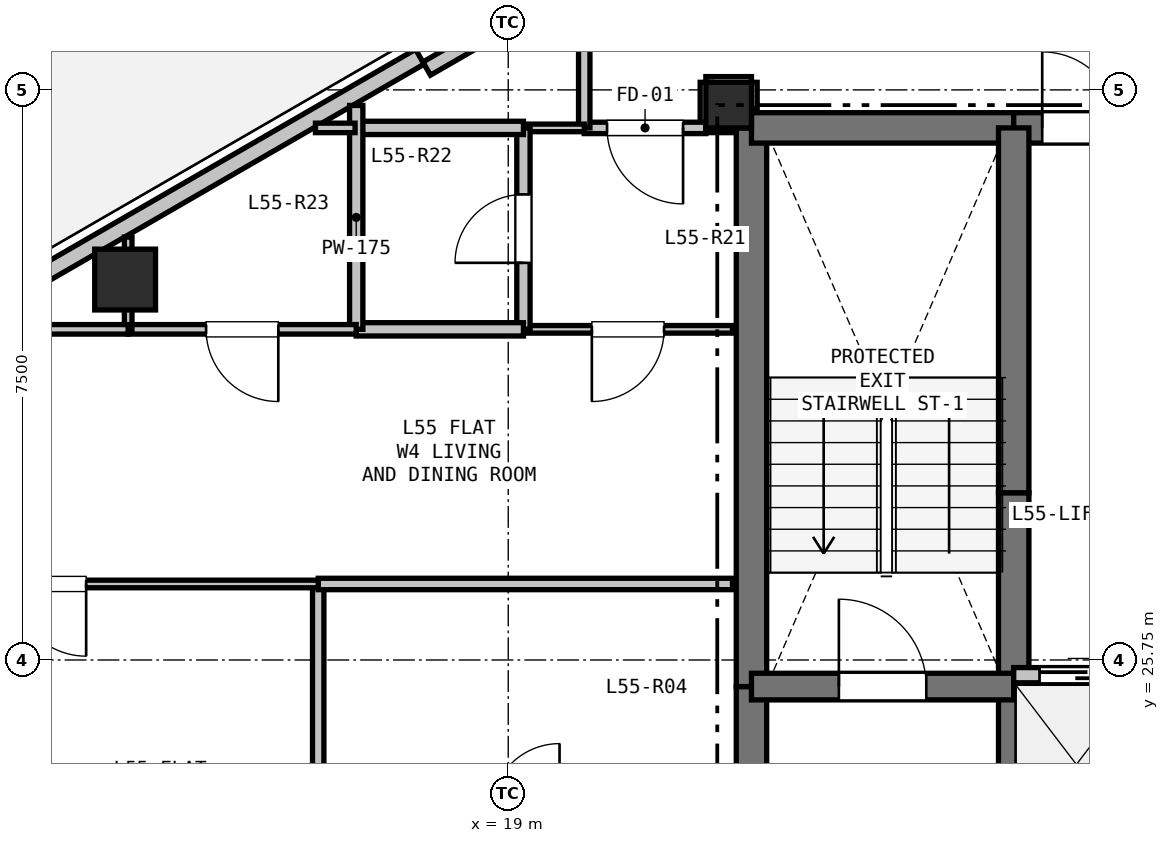
"""IFC4 building model, lengths in metres.
Left out: names, types, materials, properties, quantities, classifications, styles, units other than length and angle.
Written with IfcOpenShell. Run it as: python <this file> out.ifc"""

import sys

from ifc_helpers import new_model, si_unit, direction, frame, frame_2d, origin, origin_2d, place, context, subcontext, project, spatial, rectangle, hollow_rectangle, extrude, element, fill, save


model = new_model("IFC4")
c1 = context("Model", 3, precision=1e-05, world=origin(), true_north=direction((0.0, 1.0)))
c2 = subcontext(c1, "Body", "Model", "MODEL_VIEW")
j1 = project(units=[si_unit("LENGTHUNIT", "METRE"), si_unit("PLANEANGLEUNIT", "RADIAN")], contexts=[c1])
p1 = place(None, origin())
s1 = spatial("IfcSite", under=j1, at=p1, CompositionType="ELEMENT")
p2 = place(p1, origin())
s2 = spatial("IfcBuilding", under=s1, at=p2, CompositionType="ELEMENT")
p3 = place(p2, frame((0.0, 0.0, 198.6)))
s3 = spatial("IfcBuildingStorey", under=s2, at=p3, CompositionType="ELEMENT", Elevation=198.6)
p4 = place(p3, frame((21.9, 33.05, 0.0), z_axis=(0.0, 0.0, 1.0), x_axis=(1.0, 0.0, 0.0)))
e1 = element("IfcColumn", 1, at=p4, inside=s3, PredefinedType="COLUMN", context=c2, shape_type="SweptSolid", body=[
    extrude(rectangle(XDim=0.6, YDim=0.6, at=origin_2d()), origin(), (0.0, 0.0, 1.0), 3.3),
])
p5 = place(p3, frame((13.96, 30.755, 0.0), z_axis=(0.0, 0.0, 1.0), x_axis=(1.0, 0.0, 0.0)))
e2 = element("IfcColumn", 2, at=p5, inside=s3, PredefinedType="COLUMN", context=c2, shape_type="SweptSolid", body=[
    extrude(hollow_rectangle(XDim=0.8, YDim=0.8, WallThickness=0.025, at=origin_2d()), origin(), (0.0, 0.0, 1.0), 3.3),
])
p6 = place(p3, frame((9.438, 28.837, 0.0), z_axis=(0.0, 0.0, 1.0), x_axis=(0.866027133173, 0.499997004599, 0.0)))
e3 = element("IfcWall", 3, at=p6, inside=s3, PredefinedType="SOLIDWALL", context=c2, shape_type="SweptSolid", body=[
    extrude(rectangle(XDim=9.699, YDim=0.225, at=frame_2d((4.849, 0.0))), origin(), (0.0, 0.0, 1.0), 2.69),
])
p7 = place(p3, frame((17.927, 33.53, 0.0), z_axis=(0.0, 0.0, 1.0), x_axis=(0.86605165483, 0.499954529098, 0.0)))
e4 = element("IfcWall", 4, at=p7, inside=s3, PredefinedType="PARAPET", context=c2, shape_type="SweptSolid", body=[
    extrude(rectangle(XDim=1.7, YDim=0.2, at=frame_2d((0.85, 0.0))), origin(), (0.0, 0.0, 1.0), 2.69),
])
p8 = place(p3, frame((17.837, 19.814, 0.0), z_axis=(0.0, 0.0, 1.0), x_axis=(-0.866027133173, 0.499997004599, 0.0)))
e5 = element("IfcWall", 5, at=p8, inside=s3, PredefinedType="SOLIDWALL", context=c2, shape_type="SweptSolid", body=[
    extrude(rectangle(XDim=9.699, YDim=0.225, at=frame_2d((4.849, 0.0))), origin(), (0.0, 0.0, 1.0), 2.69),
])
p9 = place(p8, frame((5.108, 0.0, 0.9)))
e6 = element("IfcOpeningElement", 6, at=p9, cuts=e5, PredefinedType="OPENING", context=c2, shape_type="SweptSolid", body=[
    extrude(rectangle(XDim=1.2, YDim=1.4, at=frame_2d((0.6, 0.7))), frame((0.0, 0.123, 0.0), z_axis=(0.0, -1.0, 0.0), x_axis=(1.0, 0.0, 0.0)), (0.0, 0.0, 1.0), 0.245),
])
p10 = place(p3, frame((22.2, 20.75, 0.0), z_axis=(0.0, 0.0, 1.0), x_axis=(0.0, 1.0, 0.0)))
e7 = element("IfcWall", 7, at=p10, inside=s3, PredefinedType="SHEAR", context=c2, shape_type="SweptSolid", body=[
    extrude(rectangle(XDim=4.65, YDim=0.4, at=frame_2d((2.325, 0.0))), origin(), (0.0, 0.0, 1.0), 3.07),
])
p11 = place(p3, frame((22.2, 25.4, 0.0), z_axis=(0.0, 0.0, 1.0), x_axis=(0.0, 1.0, 0.0)))
e8 = element("IfcWall", 8, at=p11, inside=s3, PredefinedType="SHEAR", context=c2, shape_type="SweptSolid", body=[
    extrude(rectangle(XDim=7.35, YDim=0.4, at=frame_2d((3.675, 0.0))), origin(), (0.0, 0.0, 1.0), 3.07),
])
p12 = place(p3, frame((22.2, 32.75, 0.0), z_axis=(0.0, 0.0, 1.0), x_axis=(1.0, 0.0, 0.0)))
e9 = element("IfcWall", 9, at=p12, inside=s3, PredefinedType="SHEAR", context=c2, shape_type="SweptSolid", body=[
    extrude(rectangle(XDim=3.45, YDim=0.4, at=frame_2d((1.725, 0.0))), origin(), (0.0, 0.0, 1.0), 3.07),
])
p13 = place(p3, frame((25.65, 32.75, 0.0), z_axis=(0.0, 0.0, 1.0), x_axis=(1.0, 0.0, 0.0)))
e10 = element("IfcWall", 10, at=p13, inside=s3, PredefinedType="SHEAR", context=c2, shape_type="SweptSolid", body=[
    extrude(rectangle(XDim=1.75, YDim=0.4, at=frame_2d((0.875, 0.0))), origin(), (0.0, 0.0, 1.0), 3.07),
])
p14 = place(p13, frame((0.375, 0.0, 0.0)))
e11 = element("IfcOpeningElement", 11, at=p14, cuts=e10, PredefinedType="OPENING", context=c2, shape_type="SweptSolid", body=[
    extrude(rectangle(XDim=1.0, YDim=2.15, at=frame_2d((0.5, 1.075))), frame((0.0, 0.21, 0.0), z_axis=(0.0, -1.0, 0.0), x_axis=(1.0, 0.0, 0.0)), (0.0, 0.0, 1.0), 0.42),
])
p15 = place(p3, frame((25.65, 22.75, 0.0), z_axis=(0.0, 0.0, 1.0), x_axis=(0.0, 1.0, 0.0)))
e12 = element("IfcWall", 12, at=p15, inside=s3, PredefinedType="SHEAR", context=c2, shape_type="SweptSolid", body=[
    extrude(rectangle(XDim=2.8, YDim=0.4, at=frame_2d((1.4, 0.0))), origin(), (0.0, 0.0, 1.0), 3.07),
])
p16 = place(p3, frame((25.65, 25.55, 0.0), z_axis=(0.0, 0.0, 1.0), x_axis=(0.0, 1.0, 0.0)))
e13 = element("IfcWall", 13, at=p16, inside=s3, PredefinedType="SHEAR", context=c2, shape_type="SweptSolid", body=[
    extrude(rectangle(XDim=2.4, YDim=0.4, at=frame_2d((1.2, 0.0))), origin(), (0.0, 0.0, 1.0), 3.07),
])
p17 = place(p3, frame((25.65, 27.95, 0.0), z_axis=(0.0, 0.0, 1.0), x_axis=(0.0, 1.0, 0.0)))
e14 = element("IfcWall", 14, at=p17, inside=s3, PredefinedType="SHEAR", context=c2, shape_type="SweptSolid", body=[
    extrude(rectangle(XDim=4.8, YDim=0.4, at=frame_2d((2.4, 0.0))), origin(), (0.0, 0.0, 1.0), 3.07),
])
p18 = place(p3, frame((22.2, 25.4, 0.0), z_axis=(0.0, 0.0, 1.0), x_axis=(1.0, 0.0, 0.0)))
e15 = element("IfcWall", 15, at=p18, inside=s3, PredefinedType="SHEAR", context=c2, shape_type="SweptSolid", body=[
    extrude(rectangle(XDim=3.45, YDim=0.35, at=frame_2d((1.725, 0.0))), origin(), (0.0, 0.0, 1.0), 3.07),
])
p19 = place(p18, frame((1.15, 0.0, 0.0)))
e16 = element("IfcOpeningElement", 16, at=p19, cuts=e15, PredefinedType="OPENING", context=c2, shape_type="SweptSolid", body=[
    extrude(rectangle(XDim=1.15, YDim=2.15, at=frame_2d((0.575, 1.075))), frame((0.0, 0.185, 0.0), z_axis=(0.0, -1.0, 0.0), x_axis=(1.0, 0.0, 0.0)), (0.0, 0.0, 1.0), 0.37),
])
p20 = place(p3, frame((25.65, 25.55, 0.0), z_axis=(0.0, 0.0, 1.0), x_axis=(1.0, 0.0, 0.0)))
e17 = element("IfcWall", 17, at=p20, inside=s3, PredefinedType="PARTITIONING", context=c2, shape_type="SweptSolid", body=[
    extrude(rectangle(XDim=4.95, YDim=0.2, at=frame_2d((2.475, 0.0))), origin(), (0.0, 0.0, 1.0), 3.07),
])
p21 = place(p20, frame((0.34, 0.0, 0.0)))
e18 = element("IfcOpeningElement", 18, at=p21, cuts=e17, PredefinedType="OPENING", context=c2, shape_type="SweptSolid", body=[
    extrude(rectangle(XDim=1.1, YDim=2.15, at=frame_2d((0.55, 1.075))), frame((0.0, 0.11, 0.0), z_axis=(0.0, -1.0, 0.0), x_axis=(1.0, 0.0, 0.0)), (0.0, 0.0, 1.0), 0.22),
])
p22 = place(p20, frame((1.99, 0.0, 0.0)))
e19 = element("IfcOpeningElement", 19, at=p22, cuts=e17, PredefinedType="OPENING", context=c2, shape_type="SweptSolid", body=[
    extrude(rectangle(XDim=1.1, YDim=2.15, at=frame_2d((0.55, 1.075))), frame((0.0, 0.11, 0.0), z_axis=(0.0, -1.0, 0.0), x_axis=(1.0, 0.0, 0.0)), (0.0, 0.0, 1.0), 0.22),
])
p23 = place(p20, frame((3.64, 0.0, 0.0)))
e20 = element("IfcOpeningElement", 20, at=p23, cuts=e17, PredefinedType="OPENING", context=c2, shape_type="SweptSolid", body=[
    extrude(rectangle(XDim=1.1, YDim=2.15, at=frame_2d((0.55, 1.075))), frame((0.0, 0.11, 0.0), z_axis=(0.0, -1.0, 0.0), x_axis=(1.0, 0.0, 0.0)), (0.0, 0.0, 1.0), 0.22),
])
p24 = place(p3, frame((22.2, 33.0, 0.0), z_axis=(0.0, 0.0, 1.0), x_axis=(0.0, 1.0, 0.0)))
e21 = element("IfcWall", 21, at=p24, inside=s3, PredefinedType="PARTITIONING", context=c2, shape_type="SweptSolid", body=[
    extrude(rectangle(XDim=0.35, YDim=0.15, at=frame_2d((0.175, 0.0))), origin(), (0.0, 0.0, 1.0), 2.595),
])
p25 = place(p3, frame((22.2, 33.35, 0.0), z_axis=(0.0, 0.0, 1.0), x_axis=(-1.0, 0.0, 0.0)))
e22 = element("IfcWall", 22, at=p25, inside=s3, PredefinedType="PARTITIONING", context=c2, shape_type="SweptSolid", body=[
    extrude(rectangle(XDim=0.6, YDim=0.15, at=frame_2d((0.3, 0.0))), origin(), (0.0, 0.0, 1.0), 3.07),
])
p26 = place(p3, frame((21.6, 33.35, 0.0), z_axis=(0.0, 0.0, 1.0), x_axis=(0.0, -1.0, 0.0)))
e23 = element("IfcWall", 23, at=p26, inside=s3, PredefinedType="PARTITIONING", context=c2, shape_type="SweptSolid", body=[
    extrude(rectangle(XDim=0.6, YDim=0.15, at=frame_2d((0.3, 0.0))), origin(), (0.0, 0.0, 1.0), 2.518),
])
p27 = place(p3, frame((21.6, 32.75, 0.0), z_axis=(0.0, 0.0, 1.0), x_axis=(-1.0, 0.0, 0.0)))
e24 = element("IfcWall", 24, at=p27, inside=s3, PredefinedType="PARTITIONING", context=c2, shape_type="SweptSolid", body=[
    extrude(rectangle(XDim=1.6, YDim=0.15, at=frame_2d((0.8, 0.0))), origin(), (0.0, 0.0, 1.0), 2.518),
])
p28 = place(p27, frame((0.3, 0.0, 0.0)))
e25 = element("IfcOpeningElement", 25, at=p28, cuts=e24, PredefinedType="OPENING", context=c2, shape_type="SweptSolid", body=[
    extrude(rectangle(XDim=1.0, YDim=2.15, at=frame_2d((0.5, 1.075))), frame((0.0, 0.085, 0.0), z_axis=(0.0, -1.0, 0.0), x_axis=(1.0, 0.0, 0.0)), (0.0, 0.0, 1.0), 0.17),
])
p29 = place(p3, frame((20.0, 32.75, 0.0), z_axis=(0.0, 0.0, 1.0), x_axis=(0.0, 1.0, 0.0)))
e26 = element("IfcWall", 26, at=p29, inside=s3, PredefinedType="PARTITIONING", context=c2, shape_type="SweptSolid", body=[
    extrude(rectangle(XDim=2.141, YDim=0.15, at=frame_2d((1.071, 0.0))), origin(), (0.0, 0.0, 1.0), 2.365),
])
p30 = place(p3, frame((19.2, 32.75, 0.0), z_axis=(0.0, 0.0, 1.0), x_axis=(1.0, 0.0, 0.0)))
e27 = element("IfcWall", 27, at=p30, inside=s3, PredefinedType="PARTITIONING", context=c2, shape_type="SweptSolid", body=[
    extrude(rectangle(XDim=0.8, YDim=0.1, at=frame_2d((0.4, 0.0))), origin(), (0.0, 0.0, 1.0), 3.07),
])
p31 = place(p3, frame((21.6, 32.75, 0.0), z_axis=(0.0, 0.0, 1.0), x_axis=(1.0, 0.0, 0.0)))
e28 = element("IfcWall", 28, at=p31, inside=s3, PredefinedType="PARTITIONING", context=c2, shape_type="SweptSolid", body=[
    extrude(rectangle(XDim=0.35, YDim=0.125, at=frame_2d((0.175, 0.0))), origin(), (0.0, 0.0, 1.0), 2.595),
])
p32 = place(p3, frame((21.95, 30.1, 0.0), z_axis=(0.0, 0.0, 1.0), x_axis=(-1.0, 0.0, 0.0)))
e29 = element("IfcWall", 29, at=p32, inside=s3, PredefinedType="PARTITIONING", context=c2, shape_type="SweptSolid", body=[
    extrude(rectangle(XDim=2.75, YDim=0.1, at=frame_2d((1.375, 0.0))), origin(), (0.0, 0.0, 1.0), 2.595),
])
p33 = place(p32, frame((0.9, 0.0, 0.0)))
e30 = element("IfcOpeningElement", 30, at=p33, cuts=e29, PredefinedType="OPENING", context=c2, shape_type="SweptSolid", body=[
    extrude(rectangle(XDim=0.95, YDim=2.1, at=frame_2d((0.475, 1.05))), frame((0.0, 0.06, 0.0), z_axis=(0.0, -1.0, 0.0), x_axis=(1.0, 0.0, 0.0)), (0.0, 0.0, 1.0), 0.12),
])
p34 = place(p3, frame((19.2, 30.1, 0.0), z_axis=(0.0, 0.0, 1.0), x_axis=(0.0, 1.0, 0.0)))
e31 = element("IfcWall", 31, at=p34, inside=s3, PredefinedType="PLUMBINGWALL", context=c2, shape_type="SweptSolid", body=[
    extrude(rectangle(XDim=2.65, YDim=0.175, at=frame_2d((1.325, 0.0))), origin(), (0.0, 0.0, 1.0), 2.518),
])
p35 = place(p34, frame((0.875, 0.0, 0.0)))
e32 = element("IfcOpeningElement", 32, at=p35, cuts=e31, PredefinedType="OPENING", context=c2, shape_type="SweptSolid", body=[
    extrude(rectangle(XDim=0.9, YDim=2.1, at=frame_2d((0.45, 1.05))), frame((0.0, 0.097, 0.0), z_axis=(0.0, -1.0, 0.0), x_axis=(1.0, 0.0, 0.0)), (0.0, 0.0, 1.0), 0.195),
])
p36 = place(p3, frame((17.0, 32.75, 0.0), z_axis=(0.0, 0.0, 1.0), x_axis=(1.0, 0.0, 0.0)))
e33 = element("IfcWall", 33, at=p36, inside=s3, PredefinedType="PLUMBINGWALL", context=c2, shape_type="SweptSolid", body=[
    extrude(rectangle(XDim=2.2, YDim=0.175, at=frame_2d((1.1, 0.0))), origin(), (0.0, 0.0, 1.0), 2.365),
])
p37 = place(p3, frame((19.2, 30.1, 0.0), z_axis=(0.0, 0.0, 1.0), x_axis=(-1.0, 0.0, 0.0)))
e34 = element("IfcWall", 34, at=p37, inside=s3, PredefinedType="PLUMBINGWALL", context=c2, shape_type="SweptSolid", body=[
    extrude(rectangle(XDim=2.2, YDim=0.175, at=frame_2d((1.1, 0.0))), origin(), (0.0, 0.0, 1.0), 3.07),
])
p38 = place(p3, frame((17.0, 30.1, 0.0), z_axis=(0.0, 0.0, 1.0), x_axis=(0.0, 1.0, 0.0)))
e35 = element("IfcWall", 35, at=p38, inside=s3, PredefinedType="PLUMBINGWALL", context=c2, shape_type="SweptSolid", body=[
    extrude(rectangle(XDim=2.945, YDim=0.175, at=frame_2d((1.473, 0.0))), origin(), (0.0, 0.0, 1.0), 2.365),
])
p39 = place(p3, frame((17.0, 30.1, 0.0), z_axis=(0.0, 0.0, 1.0), x_axis=(-1.0, 0.0, 0.0)))
e36 = element("IfcWall", 36, at=p39, inside=s3, PredefinedType="PARTITIONING", context=c2, shape_type="SweptSolid", body=[
    extrude(rectangle(XDim=3.0, YDim=0.125, at=frame_2d((1.5, 0.0))), origin(), (0.0, 0.0, 1.0), 3.07),
])
p40 = place(p39, frame((1.025, 0.0, 0.0)))
e37 = element("IfcOpeningElement", 37, at=p40, cuts=e36, PredefinedType="OPENING", context=c2, shape_type="SweptSolid", body=[
    extrude(rectangle(XDim=0.95, YDim=2.1, at=frame_2d((0.475, 1.05))), frame((0.0, 0.073, 0.0), z_axis=(0.0, -1.0, 0.0), x_axis=(1.0, 0.0, 0.0)), (0.0, 0.0, 1.0), 0.145),
])
p41 = place(p3, frame((14.0, 30.1, 0.0), z_axis=(0.0, 0.0, 1.0), x_axis=(0.0, 1.0, 0.0)))
e38 = element("IfcWall", 38, at=p41, inside=s3, PredefinedType="PARTITIONING", context=c2, shape_type="SweptSolid", body=[
    extrude(rectangle(XDim=1.213, YDim=0.1, at=frame_2d((0.606, 0.0))), origin(), (0.0, 0.0, 1.0), 3.07),
])
p42 = place(p3, frame((16.464, 32.75, 0.0), z_axis=(0.0, 0.0, 1.0), x_axis=(1.0, 0.0, 0.0)))
e39 = element("IfcWall", 39, at=p42, inside=s3, PredefinedType="PARTITIONING", context=c2, shape_type="SweptSolid", body=[
    extrude(rectangle(XDim=0.521, YDim=0.125, at=frame_2d((0.261, 0.0))), origin(), (0.0, 0.0, 1.0), 3.07),
])
p43 = place(p3, frame((16.5, 23.75, 0.0), z_axis=(0.0, 0.0, 1.0), x_axis=(0.0, 1.0, 0.0)))
e40 = element("IfcWall", 40, at=p43, inside=s3, PredefinedType="PARTITIONING", context=c2, shape_type="SweptSolid", body=[
    extrude(rectangle(XDim=3.0, YDim=0.15, at=frame_2d((1.5, 0.0))), origin(), (0.0, 0.0, 1.0), 3.07),
])
p44 = place(p3, frame((16.5, 26.75, 0.0), z_axis=(0.0, 0.0, 1.0), x_axis=(1.0, 0.0, 0.0)))
e41 = element("IfcWall", 41, at=p44, inside=s3, PredefinedType="PARTITIONING", context=c2, shape_type="SweptSolid", body=[
    extrude(rectangle(XDim=5.45, YDim=0.15, at=frame_2d((2.725, 0.0))), origin(), (0.0, 0.0, 1.0), 2.595),
])
p45 = place(p3, frame((11.874, 30.1, 0.0), z_axis=(0.0, 0.0, 1.0), x_axis=(1.0, 0.0, 0.0)))
e42 = element("IfcWall", 42, at=p45, inside=s3, PredefinedType="PARTITIONING", context=c2, shape_type="SweptSolid", body=[
    extrude(rectangle(XDim=2.126, YDim=0.125, at=frame_2d((1.063, 0.0))), origin(), (0.0, 0.0, 1.0), 2.795),
])
p46 = place(p3, frame((16.5, 26.75, 0.0), z_axis=(0.0, 0.0, 1.0), x_axis=(-1.0, 0.0, 0.0)))
e43 = element("IfcWall", 43, at=p46, inside=s3, PredefinedType="PARTITIONING", context=c2, shape_type="SweptSolid", body=[
    extrude(rectangle(XDim=7.056, YDim=0.1, at=frame_2d((3.528, 0.0))), origin(), (0.0, 0.0, 1.0), 2.795),
])
p47 = place(p46, frame((3.053, 0.0, 0.0)))
e44 = element("IfcOpeningElement", 44, at=p47, cuts=e43, PredefinedType="OPENING", context=c2, shape_type="SweptSolid", body=[
    extrude(rectangle(XDim=0.95, YDim=2.1, at=frame_2d((0.475, 1.05))), frame((0.0, 0.06, 0.0), z_axis=(0.0, -1.0, 0.0), x_axis=(1.0, 0.0, 0.0)), (0.0, 0.0, 1.0), 0.12),
])
p48 = place(p21, origin())
e45 = element("IfcDoor", 45, at=p48, inside=s3, OperationType="SLIDING_TO_LEFT", PredefinedType="DOOR", context=c2, shape_type="SweptSolid", body=[
    extrude(rectangle(XDim=1.1, YDim=2.15, at=frame_2d((0.55, 1.075))), frame((0.0, 0.025, 0.0), z_axis=(0.0, -1.0, 0.0), x_axis=(1.0, 0.0, 0.0)), (0.0, 0.0, 1.0), 0.05),
])
fill(e18, e45)
p49 = place(p14, origin())
e46 = element("IfcDoor", 46, at=p49, inside=s3, OperationType="SINGLE_SWING_LEFT", PredefinedType="DOOR", context=c2, shape_type="SweptSolid", body=[
    extrude(rectangle(XDim=1.0, YDim=2.15, at=frame_2d((0.5, 1.075))), frame((0.0, 0.025, 0.0), z_axis=(0.0, -1.0, 0.0), x_axis=(1.0, 0.0, 0.0)), (0.0, 0.0, 1.0), 0.05),
])
fill(e11, e46)
p50 = place(p19, origin())
e47 = element("IfcDoor", 47, at=p50, inside=s3, OperationType="SINGLE_SWING_LEFT", PredefinedType="DOOR", context=c2, shape_type="SweptSolid", body=[
    extrude(rectangle(XDim=1.15, YDim=2.15, at=frame_2d((0.575, 1.075))), frame((0.0, 0.025, 0.0), z_axis=(0.0, -1.0, 0.0), x_axis=(1.0, 0.0, 0.0)), (0.0, 0.0, 1.0), 0.05),
])
fill(e16, e47)
p51 = place(p28, origin())
e48 = element("IfcDoor", 48, at=p51, inside=s3, OperationType="SINGLE_SWING_LEFT", PredefinedType="DOOR", context=c2, shape_type="SweptSolid", body=[
    extrude(rectangle(XDim=1.0, YDim=2.15, at=frame_2d((0.5, 1.075))), frame((0.0, 0.025, 0.0), z_axis=(0.0, -1.0, 0.0), x_axis=(1.0, 0.0, 0.0)), (0.0, 0.0, 1.0), 0.05),
])
fill(e25, e48)
p52 = place(p35, origin())
e49 = element("IfcDoor", 49, at=p52, inside=s3, OperationType="SINGLE_SWING_LEFT", PredefinedType="DOOR", context=c2, shape_type="SweptSolid", body=[
    extrude(rectangle(XDim=0.9, YDim=2.1, at=frame_2d((0.45, 1.05))), frame((0.0, 0.025, 0.0), z_axis=(0.0, -1.0, 0.0), x_axis=(1.0, 0.0, 0.0)), (0.0, 0.0, 1.0), 0.05),
])
fill(e32, e49)
p53 = place(p33, origin())
e50 = element("IfcDoor", 50, at=p53, inside=s3, OperationType="SINGLE_SWING_RIGHT", PredefinedType="DOOR", context=c2, shape_type="SweptSolid", body=[
    extrude(rectangle(XDim=0.95, YDim=2.1, at=frame_2d((0.475, 1.05))), frame((0.0, 0.025, 0.0), z_axis=(0.0, -1.0, 0.0), x_axis=(1.0, 0.0, 0.0)), (0.0, 0.0, 1.0), 0.05),
])
fill(e30, e50)
p54 = place(p40, origin())
e51 = element("IfcDoor", 51, at=p54, inside=s3, OperationType="SINGLE_SWING_LEFT", PredefinedType="DOOR", context=c2, shape_type="SweptSolid", body=[
    extrude(rectangle(XDim=0.95, YDim=2.1, at=frame_2d((0.475, 1.05))), frame((0.0, 0.025, 0.0), z_axis=(0.0, -1.0, 0.0), x_axis=(1.0, 0.0, 0.0)), (0.0, 0.0, 1.0), 0.05),
])
fill(e37, e51)
p55 = place(p47, origin())
e52 = element("IfcDoor", 52, at=p55, inside=s3, OperationType="SINGLE_SWING_LEFT", PredefinedType="DOOR", context=c2, shape_type="SweptSolid", body=[
    extrude(rectangle(XDim=0.95, YDim=2.1, at=frame_2d((0.475, 1.05))), frame((0.0, 0.025, 0.0), z_axis=(0.0, -1.0, 0.0), x_axis=(1.0, 0.0, 0.0)), (0.0, 0.0, 1.0), 0.05),
])
fill(e44, e52)
save(model, sys.argv[1])
